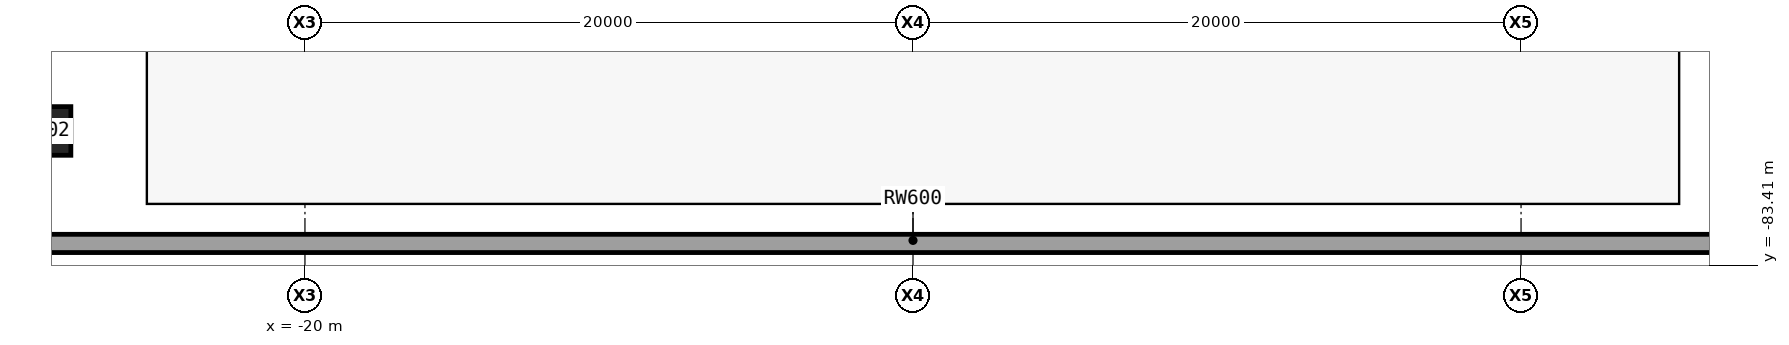
"""IFC4 building model, lengths in metres.
Left out: names, types, materials, properties, quantities, classifications, styles, units other than length and angle.
Written with IfcOpenShell. Run it as: python <this file> out.ifc"""

import sys

from ifc_helpers import new_model, si_unit, direction, frame, origin, origin_2d, place, context, subcontext, project, spatial, polyline, rectangle, outline, extrude, element, save


model = new_model("IFC4")
c1 = context("Model", 3, precision=1e-05, world=origin(), true_north=direction((0.0, 1.0)))
c2 = subcontext(c1, "Body", "Model", "MODEL_VIEW")
j1 = project(units=[si_unit("LENGTHUNIT", "METRE"), si_unit("PLANEANGLEUNIT", "RADIAN")], contexts=[c1])
p1 = place(None, origin())
s1 = spatial("IfcSite", under=j1, at=p1, CompositionType="ELEMENT")
p2 = place(p1, origin())
s2 = spatial("IfcBuilding", under=s1, at=p2, CompositionType="ELEMENT")
p3 = place(p2, frame((0.0, 0.0, -9.0)))
s3 = spatial("IfcBuildingStorey", under=s2, at=p3, CompositionType="ELEMENT", Elevation=-9.0)
p4 = place(p3, frame((-51.0, -82.7, 0.0), z_axis=(0.0, 0.0, 1.0), x_axis=(1.0, 0.0, 0.0)))
e1 = element("IfcWall", 1, at=p4, inside=s3, PredefinedType="SOLIDWALL", context=c2, shape_type="SweptSolid", body=[
    extrude(outline(polyline([(0.0, -0.3), (0.0, 0.3), (0.6, 0.3), (101.4, 0.3), (102.0, 0.3), (102.0, -0.3), (0.0, -0.3)])), origin(), (0.0, 0.0, 1.0), 4.5),
])
p5 = place(p3, frame((-28.5, -79.0, 0.0), z_axis=(0.0, 0.0, 1.0), x_axis=(1.0, 0.0, 0.0)))
e2 = element("IfcColumn", 2, at=p5, inside=s3, PredefinedType="COLUMN", context=c2, shape_type="SweptSolid", body=[
    extrude(rectangle(XDim=1.6, YDim=1.6, at=origin_2d()), origin(), (0.0, 0.0, 1.0), 4.5),
])
save(model, sys.argv[1])
